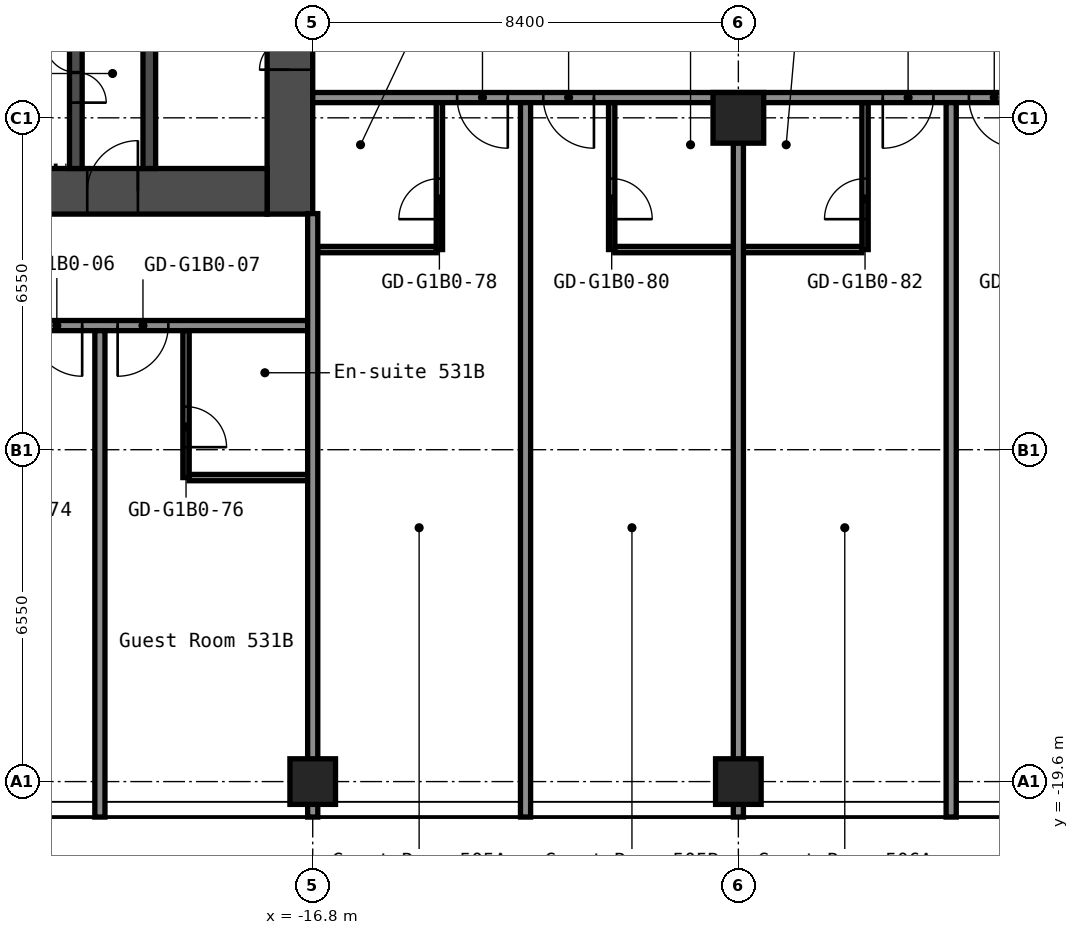
"""IFC4 building model, lengths in metres.
Left out: names, types, materials, properties, quantities, classifications, styles, units other than length and angle.
Written with IfcOpenShell. Run it as: python <this file> out.ifc"""

import sys

from ifc_helpers import new_model, si_unit, direction, frame, frame_2d, origin, origin_2d, place, context, subcontext, project, spatial, rectangle, hollow_rectangle, extrude, element, fill, save


model = new_model("IFC4")
c1 = context("Model", 3, precision=1e-05, world=origin(), true_north=direction((0.0, 1.0)))
c2 = subcontext(c1, "Body", "Model", "MODEL_VIEW")
j1 = project(units=[si_unit("LENGTHUNIT", "METRE"), si_unit("PLANEANGLEUNIT", "RADIAN")], contexts=[c1])
p1 = place(None, origin())
s1 = spatial("IfcSite", under=j1, at=p1, CompositionType="ELEMENT")
p2 = place(p1, origin())
s2 = spatial("IfcBuilding", under=s1, at=p2, CompositionType="ELEMENT")
p3 = place(p2, frame((0.0, 0.0, 23.0)))
s3 = spatial("IfcBuildingStorey", under=s2, at=p3, CompositionType="ELEMENT", Elevation=23.0)
for number, where, z_axis, x_axis in (
    (1, (-16.8, -19.6, 0.0), (0.0, 0.0, 1.0), (1.0, 0.0, 0.0)),
    (2, (-8.4, -19.6, 0.0), (0.0, 0.0, 1.0), (1.0, 0.0, 0.0)),
):
    element("IfcColumn", number, at=place(p3, frame(where, z_axis=z_axis, x_axis=x_axis)), inside=s3, PredefinedType="COLUMN", context=c2, shape_type="SweptSolid", body=[
        extrude(hollow_rectangle(XDim=0.9, YDim=0.9, WallThickness=0.036, at=origin_2d()), origin(), (0.0, 0.0, 1.0), 2.8),
    ])
p4 = place(p3, frame((-8.4, -6.5, 0.0), z_axis=(0.0, 0.0, 1.0), x_axis=(1.0, 0.0, 0.0)))
e3 = element("IfcColumn", 3, at=p4, inside=s3, PredefinedType="COLUMN", context=c2, shape_type="SweptSolid", body=[
    extrude(hollow_rectangle(XDim=1.0, YDim=1.0, WallThickness=0.04, at=origin_2d()), origin(), (0.0, 0.0, 1.0), 2.8),
])
p5 = place(p3, frame((-17.25, -8.4, 0.0), z_axis=(0.0, 0.0, 1.0), x_axis=(0.0, 1.0, 0.0)))
e4 = element("IfcWall", 4, at=p5, inside=s3, PredefinedType="SHEAR", context=c2, shape_type="SweptSolid", body=[
    extrude(rectangle(XDim=16.8, YDim=0.9, at=frame_2d((8.4, 0.0))), origin(), (0.0, 0.0, 1.0), 2.8),
])
p6 = place(p5, frame((12.75, 0.0, 0.0)))
e5 = element("IfcOpeningElement", 5, at=p6, cuts=e4, PredefinedType="OPENING", context=c2, shape_type="SweptSolid", body=[
    extrude(rectangle(XDim=1.2, YDim=2.1, at=frame_2d((0.6, 1.05))), frame((0.0, 0.46, 0.0), z_axis=(0.0, -1.0, 0.0), x_axis=(1.0, 0.0, 0.0)), (0.0, 0.0, 1.0), 0.92),
])
p7 = place(p5, frame((2.85, 0.0, 0.0)))
e6 = element("IfcOpeningElement", 6, at=p7, cuts=e4, PredefinedType="OPENING", context=c2, shape_type="SweptSolid", body=[
    extrude(rectangle(XDim=1.2, YDim=2.1, at=frame_2d((0.6, 1.05))), frame((0.0, 0.46, 0.0), z_axis=(0.0, -1.0, 0.0), x_axis=(1.0, 0.0, 0.0)), (0.0, 0.0, 1.0), 0.92),
])
p8 = place(p3, frame((-32.7, -7.95, 0.0), z_axis=(0.0, 0.0, 1.0), x_axis=(1.0, 0.0, 0.0)))
e7 = element("IfcWall", 7, at=p8, inside=s3, PredefinedType="SHEAR", context=c2, shape_type="SweptSolid", body=[
    extrude(rectangle(XDim=15.0, YDim=0.9, at=frame_2d((7.5, 0.0))), origin(), (0.0, 0.0, 1.0), 2.8),
])
p9 = place(p8, frame((11.45, 0.0, 0.0)))
e8 = element("IfcOpeningElement", 8, at=p9, cuts=e7, PredefinedType="OPENING", context=c2, shape_type="SweptSolid", body=[
    extrude(rectangle(XDim=1.0, YDim=2.1, at=frame_2d((0.5, 1.05))), frame((0.0, 0.46, 0.0), z_axis=(0.0, -1.0, 0.0), x_axis=(1.0, 0.0, 0.0)), (0.0, 0.0, 1.0), 0.92),
])
p10 = place(p3, frame((-20.025, -7.5, 0.0), z_axis=(0.0, 0.0, 1.0), x_axis=(0.0, 1.0, 0.0)))
e9 = element("IfcWall", 9, at=p10, inside=s3, PredefinedType="SHEAR", context=c2, shape_type="SweptSolid", body=[
    extrude(rectangle(XDim=6.3, YDim=0.25, at=frame_2d((3.15, 0.0))), origin(), (0.0, 0.0, 1.0), 2.8),
])
p11 = place(p10, frame((2.4, 0.0, 0.0)))
e10 = element("IfcOpeningElement", 10, at=p11, cuts=e9, PredefinedType="OPENING", context=c2, shape_type="SweptSolid", body=[
    extrude(rectangle(XDim=1.0, YDim=2.1, at=frame_2d((0.5, 1.05))), frame((0.0, 0.135, 0.0), z_axis=(0.0, -1.0, 0.0), x_axis=(1.0, 0.0, 0.0)), (0.0, 0.0, 1.0), 0.27),
])
p12 = place(p3, frame((-21.475, -7.5, 0.0), z_axis=(0.0, 0.0, 1.0), x_axis=(0.0, 1.0, 0.0)))
e11 = element("IfcWall", 11, at=p12, inside=s3, PredefinedType="SHEAR", context=c2, shape_type="SweptSolid", body=[
    extrude(rectangle(XDim=3.75, YDim=0.25, at=frame_2d((1.875, 0.0))), origin(), (0.0, 0.0, 1.0), 2.8),
])
p13 = place(p12, frame((1.3, 0.0, 0.0)))
e12 = element("IfcOpeningElement", 12, at=p13, cuts=e11, PredefinedType="OPENING", context=c2, shape_type="SweptSolid", body=[
    extrude(rectangle(XDim=1.2, YDim=2.1, at=frame_2d((0.6, 1.05))), frame((0.0, 0.135, 0.0), z_axis=(0.0, -1.0, 0.0), x_axis=(1.0, 0.0, 0.0)), (0.0, 0.0, 1.0), 0.27),
])
p14 = place(p3, frame((-19.238, -13.6, 0.0), z_axis=(0.0, 0.0, 1.0), x_axis=(1.0, 0.0, 0.0)))
e13 = element("IfcWall", 13, at=p14, inside=s3, PredefinedType="PARTITIONING", context=c2, shape_type="SweptSolid", body=[
    extrude(rectangle(XDim=2.338, YDim=0.125, at=frame_2d((1.169, 0.0))), origin(), (0.0, 0.0, 1.0), 2.8),
])
p15 = place(p3, frame((-51.1, -10.6, 0.0), z_axis=(0.0, 0.0, 1.0), x_axis=(1.0, 0.0, 0.0)))
e14 = element("IfcWall", 14, at=p15, inside=s3, PredefinedType="PARTITIONING", context=c2, shape_type="SweptSolid", body=[
    extrude(rectangle(XDim=34.3, YDim=0.2, at=frame_2d((17.15, 0.0))), origin(), (0.0, 0.0, 1.0), 2.8),
])
p16 = place(p15, frame((2.4, 0.0, 0.0)))
e15 = element("IfcOpeningElement", 15, at=p16, cuts=e14, PredefinedType="OPENING", context=c2, shape_type="SweptSolid", body=[
    extrude(rectangle(XDim=1.0, YDim=2.1, at=frame_2d((0.5, 1.05))), frame((0.0, 0.11, 0.0), z_axis=(0.0, -1.0, 0.0), x_axis=(1.0, 0.0, 0.0)), (0.0, 0.0, 1.0), 0.22),
])
p17 = place(p15, frame((11.95, 0.0, 0.0)))
e16 = element("IfcOpeningElement", 16, at=p17, cuts=e14, PredefinedType="OPENING", context=c2, shape_type="SweptSolid", body=[
    extrude(rectangle(XDim=1.0, YDim=2.1, at=frame_2d((0.5, 1.05))), frame((0.0, 0.11, 0.0), z_axis=(0.0, -1.0, 0.0), x_axis=(1.0, 0.0, 0.0)), (0.0, 0.0, 1.0), 0.22),
])
p18 = place(p15, frame((13.65, 0.0, 0.0)))
e17 = element("IfcOpeningElement", 17, at=p18, cuts=e14, PredefinedType="OPENING", context=c2, shape_type="SweptSolid", body=[
    extrude(rectangle(XDim=1.0, YDim=2.1, at=frame_2d((0.5, 1.05))), frame((0.0, 0.11, 0.0), z_axis=(0.0, -1.0, 0.0), x_axis=(1.0, 0.0, 0.0)), (0.0, 0.0, 1.0), 0.22),
])
p19 = place(p15, frame((20.35, 0.0, 0.0)))
e18 = element("IfcOpeningElement", 18, at=p19, cuts=e14, PredefinedType="OPENING", context=c2, shape_type="SweptSolid", body=[
    extrude(rectangle(XDim=1.0, YDim=2.1, at=frame_2d((0.5, 1.05))), frame((0.0, 0.11, 0.0), z_axis=(0.0, -1.0, 0.0), x_axis=(1.0, 0.0, 0.0)), (0.0, 0.0, 1.0), 0.22),
])
p20 = place(p15, frame((22.05, 0.0, 0.0)))
e19 = element("IfcOpeningElement", 19, at=p20, cuts=e14, PredefinedType="OPENING", context=c2, shape_type="SweptSolid", body=[
    extrude(rectangle(XDim=1.0, YDim=2.1, at=frame_2d((0.5, 1.05))), frame((0.0, 0.11, 0.0), z_axis=(0.0, -1.0, 0.0), x_axis=(1.0, 0.0, 0.0)), (0.0, 0.0, 1.0), 0.22),
])
p21 = place(p15, frame((28.75, 0.0, 0.0)))
e20 = element("IfcOpeningElement", 20, at=p21, cuts=e14, PredefinedType="OPENING", context=c2, shape_type="SweptSolid", body=[
    extrude(rectangle(XDim=1.0, YDim=2.1, at=frame_2d((0.5, 1.05))), frame((0.0, 0.11, 0.0), z_axis=(0.0, -1.0, 0.0), x_axis=(1.0, 0.0, 0.0)), (0.0, 0.0, 1.0), 0.22),
])
p22 = place(p15, frame((30.45, 0.0, 0.0)))
e21 = element("IfcOpeningElement", 21, at=p22, cuts=e14, PredefinedType="OPENING", context=c2, shape_type="SweptSolid", body=[
    extrude(rectangle(XDim=1.0, YDim=2.1, at=frame_2d((0.5, 1.05))), frame((0.0, 0.11, 0.0), z_axis=(0.0, -1.0, 0.0), x_axis=(1.0, 0.0, 0.0)), (0.0, 0.0, 1.0), 0.22),
])
p23 = place(p3, frame((-16.7, -9.1, 0.0), z_axis=(0.0, 0.0, 1.0), x_axis=(1.0, 0.0, 0.0)))
e22 = element("IfcWall", 22, at=p23, inside=s3, PredefinedType="PARTITIONING", context=c2, shape_type="SweptSolid", body=[
    extrude(rectangle(XDim=2.337, YDim=0.125, at=frame_2d((1.169, 0.0))), origin(), (0.0, 0.0, 1.0), 2.8),
])
p24 = place(p3, frame((-10.837, -9.1, 0.0), z_axis=(0.0, 0.0, 1.0), x_axis=(1.0, 0.0, 0.0)))
e23 = element("IfcWall", 23, at=p24, inside=s3, PredefinedType="PARTITIONING", context=c2, shape_type="SweptSolid", body=[
    extrude(rectangle(XDim=4.875, YDim=0.125, at=frame_2d((2.438, 0.0))), origin(), (0.0, 0.0, 1.0), 2.8),
])
p25 = place(p3, frame((-16.8, -6.1, 0.0), z_axis=(0.0, 0.0, 1.0), x_axis=(1.0, 0.0, 0.0)))
e24 = element("IfcWall", 24, at=p25, inside=s3, PredefinedType="PARTITIONING", context=c2, shape_type="SweptSolid", body=[
    extrude(rectangle(XDim=33.6, YDim=0.2, at=frame_2d((16.8, 0.0))), origin(), (0.0, 0.0, 1.0), 2.8),
])
p26 = place(p25, frame((2.85, 0.0, 0.0)))
e25 = element("IfcOpeningElement", 25, at=p26, cuts=e24, PredefinedType="OPENING", context=c2, shape_type="SweptSolid", body=[
    extrude(rectangle(XDim=1.0, YDim=2.1, at=frame_2d((0.5, 1.05))), frame((0.0, 0.11, 0.0), z_axis=(0.0, -1.0, 0.0), x_axis=(1.0, 0.0, 0.0)), (0.0, 0.0, 1.0), 0.22),
])
p27 = place(p25, frame((4.55, 0.0, 0.0)))
e26 = element("IfcOpeningElement", 26, at=p27, cuts=e24, PredefinedType="OPENING", context=c2, shape_type="SweptSolid", body=[
    extrude(rectangle(XDim=1.0, YDim=2.1, at=frame_2d((0.5, 1.05))), frame((0.0, 0.11, 0.0), z_axis=(0.0, -1.0, 0.0), x_axis=(1.0, 0.0, 0.0)), (0.0, 0.0, 1.0), 0.22),
])
p28 = place(p25, frame((11.25, 0.0, 0.0)))
e27 = element("IfcOpeningElement", 27, at=p28, cuts=e24, PredefinedType="OPENING", context=c2, shape_type="SweptSolid", body=[
    extrude(rectangle(XDim=1.0, YDim=2.1, at=frame_2d((0.5, 1.05))), frame((0.0, 0.11, 0.0), z_axis=(0.0, -1.0, 0.0), x_axis=(1.0, 0.0, 0.0)), (0.0, 0.0, 1.0), 0.22),
])
p29 = place(p25, frame((12.95, 0.0, 0.0)))
e28 = element("IfcOpeningElement", 28, at=p29, cuts=e24, PredefinedType="OPENING", context=c2, shape_type="SweptSolid", body=[
    extrude(rectangle(XDim=1.0, YDim=2.1, at=frame_2d((0.5, 1.05))), frame((0.0, 0.11, 0.0), z_axis=(0.0, -1.0, 0.0), x_axis=(1.0, 0.0, 0.0)), (0.0, 0.0, 1.0), 0.22),
])
p30 = place(p25, frame((20.5, 0.0, 0.0)))
e29 = element("IfcOpeningElement", 29, at=p30, cuts=e24, PredefinedType="OPENING", context=c2, shape_type="SweptSolid", body=[
    extrude(rectangle(XDim=1.0, YDim=2.1, at=frame_2d((0.5, 1.05))), frame((0.0, 0.11, 0.0), z_axis=(0.0, -1.0, 0.0), x_axis=(1.0, 0.0, 0.0)), (0.0, 0.0, 1.0), 0.22),
])
p31 = place(p25, frame((28.05, 0.0, 0.0)))
e30 = element("IfcOpeningElement", 30, at=p31, cuts=e24, PredefinedType="OPENING", context=c2, shape_type="SweptSolid", body=[
    extrude(rectangle(XDim=1.0, YDim=2.1, at=frame_2d((0.5, 1.05))), frame((0.0, 0.11, 0.0), z_axis=(0.0, -1.0, 0.0), x_axis=(1.0, 0.0, 0.0)), (0.0, 0.0, 1.0), 0.22),
])
p32 = place(p25, frame((29.75, 0.0, 0.0)))
e31 = element("IfcOpeningElement", 31, at=p32, cuts=e24, PredefinedType="OPENING", context=c2, shape_type="SweptSolid", body=[
    extrude(rectangle(XDim=1.0, YDim=2.1, at=frame_2d((0.5, 1.05))), frame((0.0, 0.11, 0.0), z_axis=(0.0, -1.0, 0.0), x_axis=(1.0, 0.0, 0.0)), (0.0, 0.0, 1.0), 0.22),
])
p33 = place(p3, frame((-21.0, -20.3, 0.0), z_axis=(0.0, 0.0, 1.0), x_axis=(0.0, 1.0, 0.0)))
e32 = element("IfcWall", 32, at=p33, inside=s3, PredefinedType="PARTITIONING", context=c2, shape_type="SweptSolid", body=[
    extrude(rectangle(XDim=9.6, YDim=0.2, at=frame_2d((4.8, 0.0))), origin(), (0.0, 0.0, 1.0), 2.8),
])
p34 = place(p3, frame((-19.3, -13.6, 0.0), z_axis=(0.0, 0.0, 1.0), x_axis=(0.0, 1.0, 0.0)))
e33 = element("IfcWall", 33, at=p34, inside=s3, PredefinedType="PARTITIONING", context=c2, shape_type="SweptSolid", body=[
    extrude(rectangle(XDim=2.9, YDim=0.125, at=frame_2d((1.45, 0.0))), origin(), (0.0, 0.0, 1.0), 2.8),
])
p35 = place(p34, frame((0.6, 0.0, 0.0)))
e34 = element("IfcOpeningElement", 34, at=p35, cuts=e33, PredefinedType="OPENING", context=c2, shape_type="SweptSolid", body=[
    extrude(rectangle(XDim=0.8, YDim=2.1, at=frame_2d((0.4, 1.05))), frame((0.0, 0.073, 0.0), z_axis=(0.0, -1.0, 0.0), x_axis=(1.0, 0.0, 0.0)), (0.0, 0.0, 1.0), 0.145),
])
p36 = place(p3, frame((-16.8, -20.3, 0.0), z_axis=(0.0, 0.0, 1.0), x_axis=(0.0, 1.0, 0.0)))
e35 = element("IfcWall", 35, at=p36, inside=s3, PredefinedType="PARTITIONING", context=c2, shape_type="SweptSolid", body=[
    extrude(rectangle(XDim=11.91, YDim=0.2, at=frame_2d((5.955, 0.0))), origin(), (0.0, 0.0, 1.0), 2.8),
])
p37 = place(p3, frame((-14.3, -9.1, 0.0), z_axis=(0.0, 0.0, 1.0), x_axis=(0.0, 1.0, 0.0)))
e36 = element("IfcWall", 36, at=p37, inside=s3, PredefinedType="PARTITIONING", context=c2, shape_type="SweptSolid", body=[
    extrude(rectangle(XDim=2.9, YDim=0.125, at=frame_2d((1.45, 0.0))), origin(), (0.0, 0.0, 1.0), 2.8),
])
p38 = place(p37, frame((0.6, 0.0, 0.0)))
e37 = element("IfcOpeningElement", 37, at=p38, cuts=e36, PredefinedType="OPENING", context=c2, shape_type="SweptSolid", body=[
    extrude(rectangle(XDim=0.8, YDim=2.1, at=frame_2d((0.4, 1.05))), frame((0.0, 0.073, 0.0), z_axis=(0.0, -1.0, 0.0), x_axis=(1.0, 0.0, 0.0)), (0.0, 0.0, 1.0), 0.145),
])
p39 = place(p3, frame((-12.6, -20.3, 0.0), z_axis=(0.0, 0.0, 1.0), x_axis=(0.0, 1.0, 0.0)))
e38 = element("IfcWall", 38, at=p39, inside=s3, PredefinedType="PARTITIONING", context=c2, shape_type="SweptSolid", body=[
    extrude(rectangle(XDim=14.1, YDim=0.2, at=frame_2d((7.05, 0.0))), origin(), (0.0, 0.0, 1.0), 2.8),
])
p40 = place(p3, frame((-10.9, -9.1, 0.0), z_axis=(0.0, 0.0, 1.0), x_axis=(0.0, 1.0, 0.0)))
e39 = element("IfcWall", 39, at=p40, inside=s3, PredefinedType="PARTITIONING", context=c2, shape_type="SweptSolid", body=[
    extrude(rectangle(XDim=2.9, YDim=0.125, at=frame_2d((1.45, 0.0))), origin(), (0.0, 0.0, 1.0), 2.8),
])
p41 = place(p40, frame((0.6, 0.0, 0.0)))
e40 = element("IfcOpeningElement", 40, at=p41, cuts=e39, PredefinedType="OPENING", context=c2, shape_type="SweptSolid", body=[
    extrude(rectangle(XDim=0.8, YDim=2.1, at=frame_2d((0.4, 1.05))), frame((0.0, 0.073, 0.0), z_axis=(0.0, -1.0, 0.0), x_axis=(1.0, 0.0, 0.0)), (0.0, 0.0, 1.0), 0.145),
])
p42 = place(p3, frame((-8.4, -20.3, 0.0), z_axis=(0.0, 0.0, 1.0), x_axis=(0.0, 1.0, 0.0)))
e41 = element("IfcWall", 41, at=p42, inside=s3, PredefinedType="PARTITIONING", context=c2, shape_type="SweptSolid", body=[
    extrude(rectangle(XDim=13.31, YDim=0.2, at=frame_2d((6.655, 0.0))), origin(), (0.0, 0.0, 1.0), 2.8),
])
p43 = place(p3, frame((-5.9, -9.1, 0.0), z_axis=(0.0, 0.0, 1.0), x_axis=(0.0, 1.0, 0.0)))
e42 = element("IfcWall", 42, at=p43, inside=s3, PredefinedType="PARTITIONING", context=c2, shape_type="SweptSolid", body=[
    extrude(rectangle(XDim=2.9, YDim=0.125, at=frame_2d((1.45, 0.0))), origin(), (0.0, 0.0, 1.0), 2.8),
])
p44 = place(p43, frame((0.6, 0.0, 0.0)))
e43 = element("IfcOpeningElement", 43, at=p44, cuts=e42, PredefinedType="OPENING", context=c2, shape_type="SweptSolid", body=[
    extrude(rectangle(XDim=0.8, YDim=2.1, at=frame_2d((0.4, 1.05))), frame((0.0, 0.073, 0.0), z_axis=(0.0, -1.0, 0.0), x_axis=(1.0, 0.0, 0.0)), (0.0, 0.0, 1.0), 0.145),
])
p45 = place(p3, frame((-4.2, -20.3, 0.0), z_axis=(0.0, 0.0, 1.0), x_axis=(0.0, 1.0, 0.0)))
e44 = element("IfcWall", 44, at=p45, inside=s3, PredefinedType="PARTITIONING", context=c2, shape_type="SweptSolid", body=[
    extrude(rectangle(XDim=14.1, YDim=0.2, at=frame_2d((7.05, 0.0))), origin(), (0.0, 0.0, 1.0), 2.8),
])
p46 = place(p7, origin())
e45 = element("IfcDoor", 45, at=p46, inside=s3, OperationType="DOUBLE_DOOR_SINGLE_SWING", PredefinedType="DOOR", context=c2, shape_type="SweptSolid", body=[
    extrude(rectangle(XDim=1.2, YDim=2.1, at=frame_2d((0.6, 1.05))), frame((0.0, 0.025, 0.0), z_axis=(0.0, -1.0, 0.0), x_axis=(1.0, 0.0, 0.0)), (0.0, 0.0, 1.0), 0.05),
])
fill(e6, e45)
p47 = place(p9, origin())
e46 = element("IfcDoor", 46, at=p47, inside=s3, OperationType="SINGLE_SWING_LEFT", PredefinedType="DOOR", context=c2, shape_type="SweptSolid", body=[
    extrude(rectangle(XDim=1.0, YDim=2.1, at=frame_2d((0.5, 1.05))), frame((0.0, 0.025, 0.0), z_axis=(0.0, -1.0, 0.0), x_axis=(1.0, 0.0, 0.0)), (0.0, 0.0, 1.0), 0.05),
])
fill(e8, e46)
p48 = place(p13, origin())
e47 = element("IfcDoor", 47, at=p48, inside=s3, OperationType="DOUBLE_DOOR_SINGLE_SWING", PredefinedType="DOOR", context=c2, shape_type="SweptSolid", body=[
    extrude(rectangle(XDim=1.2, YDim=2.1, at=frame_2d((0.6, 1.05))), frame((0.0, 0.025, 0.0), z_axis=(0.0, -1.0, 0.0), x_axis=(1.0, 0.0, 0.0)), (0.0, 0.0, 1.0), 0.05),
])
fill(e12, e47)
p49 = place(p21, origin())
e48 = element("IfcDoor", 48, at=p49, inside=s3, OperationType="SINGLE_SWING_RIGHT", PredefinedType="DOOR", context=c2, shape_type="SweptSolid", body=[
    extrude(rectangle(XDim=1.0, YDim=2.1, at=frame_2d((0.5, 1.05))), frame((0.0, 0.025, 0.0), z_axis=(0.0, -1.0, 0.0), x_axis=(1.0, 0.0, 0.0)), (0.0, 0.0, 1.0), 0.05),
])
fill(e20, e48)
p50 = place(p22, origin())
e49 = element("IfcDoor", 49, at=p50, inside=s3, OperationType="SINGLE_SWING_LEFT", PredefinedType="DOOR", context=c2, shape_type="SweptSolid", body=[
    extrude(rectangle(XDim=1.0, YDim=2.1, at=frame_2d((0.5, 1.05))), frame((0.0, 0.025, 0.0), z_axis=(0.0, -1.0, 0.0), x_axis=(1.0, 0.0, 0.0)), (0.0, 0.0, 1.0), 0.05),
])
fill(e21, e49)
p51 = place(p26, origin())
e50 = element("IfcDoor", 50, at=p51, inside=s3, OperationType="SINGLE_SWING_RIGHT", PredefinedType="DOOR", context=c2, shape_type="SweptSolid", body=[
    extrude(rectangle(XDim=1.0, YDim=2.1, at=frame_2d((0.5, 1.05))), frame((0.0, 0.025, 0.0), z_axis=(0.0, -1.0, 0.0), x_axis=(1.0, 0.0, 0.0)), (0.0, 0.0, 1.0), 0.05),
])
fill(e25, e50)
p52 = place(p27, origin())
e51 = element("IfcDoor", 51, at=p52, inside=s3, OperationType="SINGLE_SWING_RIGHT", PredefinedType="DOOR", context=c2, shape_type="SweptSolid", body=[
    extrude(rectangle(XDim=1.0, YDim=2.1, at=frame_2d((0.5, 1.05))), frame((0.0, 0.025, 0.0), z_axis=(0.0, -1.0, 0.0), x_axis=(1.0, 0.0, 0.0)), (0.0, 0.0, 1.0), 0.05),
])
fill(e26, e51)
p53 = place(p28, origin())
e52 = element("IfcDoor", 52, at=p53, inside=s3, OperationType="SINGLE_SWING_LEFT", PredefinedType="DOOR", context=c2, shape_type="SweptSolid", body=[
    extrude(rectangle(XDim=1.0, YDim=2.1, at=frame_2d((0.5, 1.05))), frame((0.0, 0.025, 0.0), z_axis=(0.0, -1.0, 0.0), x_axis=(1.0, 0.0, 0.0)), (0.0, 0.0, 1.0), 0.05),
])
fill(e27, e52)
p54 = place(p29, origin())
e53 = element("IfcDoor", 53, at=p54, inside=s3, OperationType="SINGLE_SWING_RIGHT", PredefinedType="DOOR", context=c2, shape_type="SweptSolid", body=[
    extrude(rectangle(XDim=1.0, YDim=2.1, at=frame_2d((0.5, 1.05))), frame((0.0, 0.025, 0.0), z_axis=(0.0, -1.0, 0.0), x_axis=(1.0, 0.0, 0.0)), (0.0, 0.0, 1.0), 0.05),
])
fill(e28, e53)
p55 = place(p35, origin())
e54 = element("IfcDoor", 54, at=p55, inside=s3, OperationType="SINGLE_SWING_LEFT", PredefinedType="DOOR", context=c2, shape_type="SweptSolid", body=[
    extrude(rectangle(XDim=0.8, YDim=2.1, at=frame_2d((0.4, 1.05))), frame((0.0, 0.025, 0.0), z_axis=(0.0, -1.0, 0.0), x_axis=(1.0, 0.0, 0.0)), (0.0, 0.0, 1.0), 0.05),
])
fill(e34, e54)
p56 = place(p38, origin())
e55 = element("IfcDoor", 55, at=p56, inside=s3, OperationType="SINGLE_SWING_RIGHT", PredefinedType="DOOR", context=c2, shape_type="SweptSolid", body=[
    extrude(rectangle(XDim=0.8, YDim=2.1, at=frame_2d((0.4, 1.05))), frame((0.0, 0.025, 0.0), z_axis=(0.0, -1.0, 0.0), x_axis=(1.0, 0.0, 0.0)), (0.0, 0.0, 1.0), 0.05),
])
fill(e37, e55)
p57 = place(p41, origin())
e56 = element("IfcDoor", 56, at=p57, inside=s3, OperationType="SINGLE_SWING_LEFT", PredefinedType="DOOR", context=c2, shape_type="SweptSolid", body=[
    extrude(rectangle(XDim=0.8, YDim=2.1, at=frame_2d((0.4, 1.05))), frame((0.0, 0.025, 0.0), z_axis=(0.0, -1.0, 0.0), x_axis=(1.0, 0.0, 0.0)), (0.0, 0.0, 1.0), 0.05),
])
fill(e40, e56)
p58 = place(p44, origin())
e57 = element("IfcDoor", 57, at=p58, inside=s3, OperationType="SINGLE_SWING_RIGHT", PredefinedType="DOOR", context=c2, shape_type="SweptSolid", body=[
    extrude(rectangle(XDim=0.8, YDim=2.1, at=frame_2d((0.4, 1.05))), frame((0.0, 0.025, 0.0), z_axis=(0.0, -1.0, 0.0), x_axis=(1.0, 0.0, 0.0)), (0.0, 0.0, 1.0), 0.05),
])
fill(e43, e57)
save(model, sys.argv[1])
